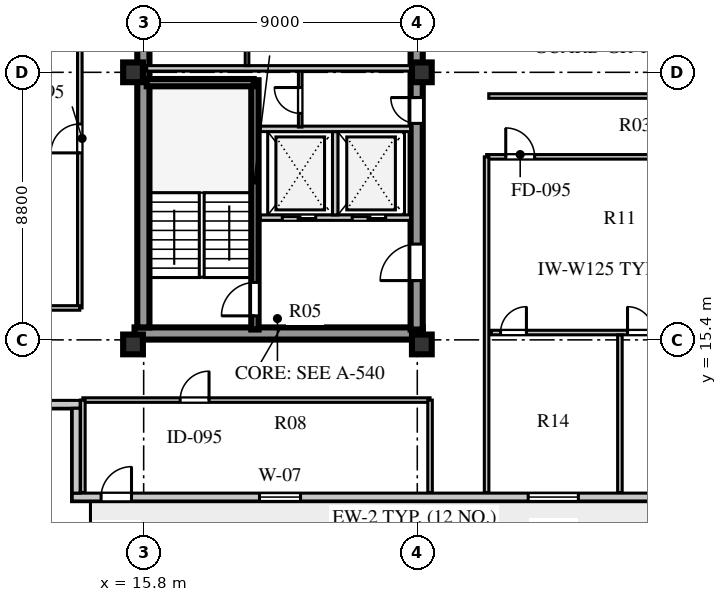
"""IFC4 building model, lengths in metres.
Left out: names, types, materials, properties, quantities, classifications, styles, units other than length and angle.
Written with IfcOpenShell. Run it as: python <this file> out.ifc"""

import sys

from ifc_helpers import new_model, si_unit, direction, frame, frame_2d, origin, origin_2d, place, context, subcontext, project, spatial, rectangle, extrude, element, fill, save


model = new_model("IFC4")
c1 = context("Model", 3, precision=1e-05, world=origin(), true_north=direction((0.0, 1.0)))
c2 = subcontext(c1, "Body", "Model", "MODEL_VIEW")
j1 = project(units=[si_unit("LENGTHUNIT", "METRE"), si_unit("PLANEANGLEUNIT", "RADIAN")], contexts=[c1])
p1 = place(None, origin())
s1 = spatial("IfcSite", under=j1, at=p1, CompositionType="ELEMENT")
p2 = place(p1, origin())
s2 = spatial("IfcBuilding", under=s1, at=p2, CompositionType="ELEMENT")
p3 = place(p2, frame((0.0, 0.0, 312.5)))
s3 = spatial("IfcBuildingStorey", under=s2, at=p3, CompositionType="ELEMENT", Elevation=312.5)
p4 = place(p3, frame((15.5, 15.61, 0.0), z_axis=(0.0, 0.0, 1.0), x_axis=(1.0, 0.0, 0.0)))
e1 = element("IfcWall", 1, at=p4, inside=s3, PredefinedType="SHEAR", context=c2, shape_type="SweptSolid", body=[
    extrude(rectangle(XDim=9.48, YDim=0.4, at=frame_2d((4.74, 0.0))), origin(), (0.0, 0.0, 1.0), 3.56),
])
p5 = place(p3, frame((15.79, 15.81, 0.0), z_axis=(0.0, 0.0, 1.0), x_axis=(0.0, 1.0, 0.0)))
e2 = element("IfcWall", 2, at=p5, inside=s3, PredefinedType="SHEAR", context=c2, shape_type="SweptSolid", body=[
    extrude(rectangle(XDim=25.63, YDim=0.4, at=frame_2d((12.815, 0.0))), origin(), (0.0, 0.0, 1.0), 3.56),
])
p6 = place(p3, frame((24.78, 15.74, 0.0), z_axis=(0.0, 0.0, 1.0), x_axis=(0.0, 1.0, 0.0)))
e3 = element("IfcWall", 3, at=p6, inside=s3, PredefinedType="SHEAR", context=c2, shape_type="SweptSolid", body=[
    extrude(rectangle(XDim=25.76, YDim=0.4, at=frame_2d((12.88, 0.0))), origin(), (0.0, 0.0, 1.0), 3.56),
])
p7 = place(p6, frame((1.61, 0.0, 0.0)))
e4 = element("IfcOpeningElement", 4, at=p7, cuts=e3, PredefinedType="OPENING", context=c2, shape_type="SweptSolid", body=[
    extrude(rectangle(XDim=1.2, YDim=2.1, at=frame_2d((0.6, 1.05))), frame((0.0, 0.21, 0.0), z_axis=(0.0, -1.0, 0.0), x_axis=(1.0, 0.0, 0.0)), (0.0, 0.0, 1.0), 0.42),
])
p8 = place(p6, frame((6.78, 0.0, 0.0)))
e5 = element("IfcOpeningElement", 5, at=p8, cuts=e3, PredefinedType="OPENING", context=c2, shape_type="SweptSolid", body=[
    extrude(rectangle(XDim=0.85, YDim=2.06, at=frame_2d((0.425, 1.03))), frame((0.0, 0.21, 0.0), z_axis=(0.0, -1.0, 0.0), x_axis=(1.0, 0.0, 0.0)), (0.0, 0.0, 1.0), 0.42),
])
p9 = place(p6, frame((12.11, 0.0, 0.0)))
e6 = element("IfcOpeningElement", 6, at=p9, cuts=e3, PredefinedType="OPENING", context=c2, shape_type="SweptSolid", body=[
    extrude(rectangle(XDim=1.5, YDim=2.12, at=frame_2d((0.75, 1.06))), frame((0.0, 0.21, 0.0), z_axis=(0.0, -1.0, 0.0), x_axis=(1.0, 0.0, 0.0)), (0.0, 0.0, 1.0), 0.42),
])
p10 = place(p6, frame((20.11, 0.0, 0.0)))
e7 = element("IfcOpeningElement", 7, at=p10, cuts=e3, PredefinedType="OPENING", context=c2, shape_type="SweptSolid", body=[
    extrude(rectangle(XDim=1.2, YDim=2.12, at=frame_2d((0.6, 1.06))), frame((0.0, 0.21, 0.0), z_axis=(0.0, -1.0, 0.0), x_axis=(1.0, 0.0, 0.0)), (0.0, 0.0, 1.0), 0.42),
])
p11 = place(p6, frame((24.01, 0.0, 0.0)))
e8 = element("IfcOpeningElement", 8, at=p11, cuts=e3, PredefinedType="OPENING", context=c2, shape_type="SweptSolid", body=[
    extrude(rectangle(XDim=0.95, YDim=2.1, at=frame_2d((0.475, 1.05))), frame((0.0, 0.21, 0.0), z_axis=(0.0, -1.0, 0.0), x_axis=(1.0, 0.0, 0.0)), (0.0, 0.0, 1.0), 0.42),
])
for number, where, z_axis, x_axis in (
    (9, (15.45, 15.25, 0.0), (0.0, 0.0, 1.0), (1.0, 0.0, 0.0)),
    (10, (15.45, 24.2, 0.0), (0.0, 0.0, 1.0), (1.0, 0.0, 0.0)),
    (11, (24.95, 15.25, 0.0), (0.0, 0.0, 1.0), (1.0, 0.0, 0.0)),
    (12, (24.95, 24.2, 0.0), (0.0, 0.0, 1.0), (1.0, 0.0, 0.0)),
):
    element("IfcColumn", number, at=place(p3, frame(where, z_axis=z_axis, x_axis=x_axis)), inside=s3, PredefinedType="COLUMN", context=c2, shape_type="SweptSolid", body=[
        extrude(rectangle(XDim=0.65, YDim=0.65, at=origin_2d()), origin(), (0.0, 0.0, 1.0), 3.56),
    ])
p12 = place(p3, frame((13.45, 10.23, 0.0), z_axis=(0.0, 0.0, 1.0), x_axis=(1.0, 0.0, 0.0)))
e13 = element("IfcWall", 13, at=p12, inside=s3, PredefinedType="SOLIDWALL", context=c2, shape_type="SweptSolid", body=[
    extrude(rectangle(XDim=31.7, YDim=0.26, at=frame_2d((15.85, 0.0))), origin(), (0.0, 0.0, 1.0), 3.56),
])
p13 = place(p12, frame((0.95, 0.0, 0.0)))
e14 = element("IfcOpeningElement", 14, at=p13, cuts=e13, PredefinedType="OPENING", context=c2, shape_type="SweptSolid", body=[
    extrude(rectangle(XDim=1.0, YDim=2.05, at=frame_2d((0.5, 1.025))), frame((0.0, 0.14, 0.0), z_axis=(0.0, -1.0, 0.0), x_axis=(1.0, 0.0, 0.0)), (0.0, 0.0, 1.0), 0.28),
])
p14 = place(p12, frame((6.16, 0.0, 0.8)))
e15 = element("IfcOpeningElement", 15, at=p14, cuts=e13, PredefinedType="OPENING", context=c2, shape_type="SweptSolid", body=[
    extrude(rectangle(XDim=1.35, YDim=1.9, at=frame_2d((0.675, 0.95))), frame((0.0, 0.14, 0.0), z_axis=(0.0, -1.0, 0.0), x_axis=(1.0, 0.0, 0.0)), (0.0, 0.0, 1.0), 0.28),
])
p15 = place(p12, frame((14.998, 0.0, 0.8)))
e16 = element("IfcOpeningElement", 16, at=p15, cuts=e13, PredefinedType="OPENING", context=c2, shape_type="SweptSolid", body=[
    extrude(rectangle(XDim=1.65, YDim=1.95, at=frame_2d((0.825, 0.975))), frame((0.0, 0.14, 0.0), z_axis=(0.0, -1.0, 0.0), x_axis=(1.0, 0.0, 0.0)), (0.0, 0.0, 1.0), 0.28),
])
p16 = place(p12, frame((20.883, 0.0, 0.8)))
e17 = element("IfcOpeningElement", 17, at=p16, cuts=e13, PredefinedType="OPENING", context=c2, shape_type="SweptSolid", body=[
    extrude(rectangle(XDim=1.95, YDim=2.0, at=frame_2d((0.975, 1.0))), frame((0.0, 0.14, 0.0), z_axis=(0.0, -1.0, 0.0), x_axis=(1.0, 0.0, 0.0)), (0.0, 0.0, 1.0), 0.28),
])
p17 = place(p12, frame((27.52, 0.0, 0.8)))
e18 = element("IfcOpeningElement", 18, at=p17, cuts=e13, PredefinedType="OPENING", context=c2, shape_type="SweptSolid", body=[
    extrude(rectangle(XDim=2.25, YDim=2.0, at=frame_2d((1.125, 1.0))), frame((0.0, 0.14, 0.0), z_axis=(0.0, -1.0, 0.0), x_axis=(1.0, 0.0, 0.0)), (0.0, 0.0, 1.0), 0.28),
])
p18 = place(p3, frame((10.4, 13.28, 0.0), z_axis=(0.0, 0.0, 1.0), x_axis=(1.0, 0.0, 0.0)))
e19 = element("IfcWall", 19, at=p18, inside=s3, PredefinedType="SOLIDWALL", context=c2, shape_type="SweptSolid", body=[
    extrude(rectangle(XDim=3.31, YDim=0.26, at=frame_2d((1.655, 0.0))), origin(), (0.0, 0.0, 1.0), 3.56),
])
p19 = place(p3, frame((13.58, 13.15, 0.0), z_axis=(0.0, 0.0, 1.0), x_axis=(0.0, -1.0, 0.0)))
e20 = element("IfcWall", 20, at=p19, inside=s3, PredefinedType="SOLIDWALL", context=c2, shape_type="SweptSolid", body=[
    extrude(rectangle(XDim=2.79, YDim=0.26, at=frame_2d((1.395, 0.0))), origin(), (0.0, 0.0, 1.0), 3.56),
])
p20 = place(p3, frame((19.46, 15.74, 0.0), z_axis=(0.0, 0.0, 1.0), x_axis=(0.0, 1.0, 0.0)))
e21 = element("IfcWall", 21, at=p20, inside=s3, PredefinedType="SHEAR", context=c2, shape_type="SweptSolid", body=[
    extrude(rectangle(XDim=8.2, YDim=0.24, at=frame_2d((4.1, 0.0))), origin(), (0.0, 0.0, 1.0), 3.8),
])
p21 = place(p20, frame((0.45, 0.0, 0.0)))
e22 = element("IfcOpeningElement", 22, at=p21, cuts=e21, PredefinedType="OPENING", context=c2, shape_type="SweptSolid", body=[
    extrude(rectangle(XDim=1.1, YDim=2.1, at=frame_2d((0.55, 1.05))), frame((0.0, 0.13, 0.0), z_axis=(0.0, -1.0, 0.0), x_axis=(1.0, 0.0, 0.0)), (0.0, 0.0, 1.0), 0.26),
])
p22 = place(p3, frame((15.9, 23.86, 0.0), z_axis=(0.0, 0.0, 1.0), x_axis=(1.0, 0.0, 0.0)))
e23 = element("IfcWall", 23, at=p22, inside=s3, PredefinedType="SHEAR", context=c2, shape_type="SweptSolid", body=[
    extrude(rectangle(XDim=3.52, YDim=0.24, at=frame_2d((1.76, 0.0))), origin(), (0.0, 0.0, 1.0), 3.8),
])
p23 = place(p3, frame((19.64, 19.42, 0.0), z_axis=(0.0, 0.0, 1.0), x_axis=(1.0, 0.0, 0.0)))
e24 = element("IfcWall", 24, at=p23, inside=s3, PredefinedType="SOLIDWALL", context=c2, shape_type="SweptSolid", body=[
    extrude(rectangle(XDim=4.94, YDim=0.18, at=frame_2d((2.47, 0.0))), origin(), (0.0, 0.0, 1.0), 3.56),
])
p24 = place(p23, frame((0.72, 0.0, 0.0)))
e25 = element("IfcOpeningElement", 25, at=p24, cuts=e24, PredefinedType="OPENING", context=c2, shape_type="SweptSolid", body=[
    extrude(rectangle(XDim=1.1, YDim=2.1, at=frame_2d((0.55, 1.05))), frame((0.0, 0.1, 0.0), z_axis=(0.0, -1.0, 0.0), x_axis=(1.0, 0.0, 0.0)), (0.0, 0.0, 1.0), 0.2),
])
p25 = place(p23, frame((3.02, 0.0, 0.0)))
e26 = element("IfcOpeningElement", 26, at=p25, cuts=e24, PredefinedType="OPENING", context=c2, shape_type="SweptSolid", body=[
    extrude(rectangle(XDim=1.1, YDim=2.1, at=frame_2d((0.55, 1.05))), frame((0.0, 0.1, 0.0), z_axis=(0.0, -1.0, 0.0), x_axis=(1.0, 0.0, 0.0)), (0.0, 0.0, 1.0), 0.2),
])
p26 = place(p3, frame((22.1, 19.51, 0.0), z_axis=(0.0, 0.0, 1.0), x_axis=(0.0, 1.0, 0.0)))
e27 = element("IfcWall", 27, at=p26, inside=s3, PredefinedType="SOLIDWALL", context=c2, shape_type="SweptSolid", body=[
    extrude(rectangle(XDim=2.74, YDim=0.18, at=frame_2d((1.37, 0.0))), origin(), (0.0, 0.0, 1.0), 3.56),
])
p27 = place(p3, frame((19.64, 22.34, 0.0), z_axis=(0.0, 0.0, 1.0), x_axis=(1.0, 0.0, 0.0)))
e28 = element("IfcWall", 28, at=p27, inside=s3, PredefinedType="SOLIDWALL", context=c2, shape_type="SweptSolid", body=[
    extrude(rectangle(XDim=4.94, YDim=0.18, at=frame_2d((2.47, 0.0))), origin(), (0.0, 0.0, 1.0), 3.56),
])
p28 = place(p3, frame((20.95, 22.4, 0.0), z_axis=(0.0, 0.0, 1.0), x_axis=(0.0, 1.0, 0.0)))
e29 = element("IfcWall", 29, at=p28, inside=s3, PredefinedType="PARTITIONING", context=c2, shape_type="SweptSolid", body=[
    extrude(rectangle(XDim=1.88, YDim=0.12, at=frame_2d((0.94, 0.0))), origin(), (0.0, 0.0, 1.0), 3.56),
])
p29 = place(p28, frame((0.45, 0.0, 0.0)))
e30 = element("IfcOpeningElement", 30, at=p29, cuts=e29, PredefinedType="OPENING", context=c2, shape_type="SweptSolid", body=[
    extrude(rectangle(XDim=0.85, YDim=2.06, at=frame_2d((0.425, 1.03))), frame((0.0, 0.07, 0.0), z_axis=(0.0, -1.0, 0.0), x_axis=(1.0, 0.0, 0.0)), (0.0, 0.0, 1.0), 0.14),
])
p30 = place(p3, frame((15.9, 24.33, 0.0), z_axis=(0.0, 0.0, 1.0), x_axis=(1.0, 0.0, 0.0)))
e31 = element("IfcWall", 31, at=p30, inside=s3, PredefinedType="SOLIDWALL", context=c2, shape_type="SweptSolid", body=[
    extrude(rectangle(XDim=8.68, YDim=0.18, at=frame_2d((4.34, 0.0))), origin(), (0.0, 0.0, 1.0), 2.96),
])
p31 = place(p3, frame((19.2, 24.42, 0.0), z_axis=(0.0, 0.0, 1.0), x_axis=(0.0, 1.0, 0.0)))
e32 = element("IfcWall", 32, at=p31, inside=s3, PredefinedType="PARTITIONING", context=c2, shape_type="SweptSolid", body=[
    extrude(rectangle(XDim=2.02, YDim=0.12, at=frame_2d((1.01, 0.0))), origin(), (0.0, 0.0, 1.0), 3.56),
])
p32 = place(p3, frame((27.08, 21.42, 0.0), z_axis=(0.0, 0.0, 1.0), x_axis=(1.0, 0.0, 0.0)))
e33 = element("IfcWall", 33, at=p32, inside=s3, PredefinedType="PARTITIONING", context=c2, shape_type="SweptSolid", body=[
    extrude(rectangle(XDim=12.07, YDim=0.15, at=frame_2d((6.035, 0.0))), origin(), (0.0, 0.0, 1.0), 3.26),
])
p33 = place(p32, frame((0.63, 0.0, 0.0)))
e34 = element("IfcOpeningElement", 34, at=p33, cuts=e33, PredefinedType="OPENING", context=c2, shape_type="SweptSolid", body=[
    extrude(rectangle(XDim=0.95, YDim=2.1, at=frame_2d((0.475, 1.05))), frame((0.0, 0.085, 0.0), z_axis=(0.0, -1.0, 0.0), x_axis=(1.0, 0.0, 0.0)), (0.0, 0.0, 1.0), 0.17),
])
p34 = place(p3, frame((27.08, 10.38, 0.0), z_axis=(0.0, 0.0, 1.0), x_axis=(0.0, 1.0, 0.0)))
e35 = element("IfcWall", 35, at=p34, inside=s3, PredefinedType="PARTITIONING", context=c2, shape_type="SweptSolid", body=[
    extrude(rectangle(XDim=11.04, YDim=0.15, at=frame_2d((5.52, 0.0))), origin(), (0.0, 0.0, 1.0), 3.56),
])
p35 = place(p3, frame((27.15, 23.42, 0.0), z_axis=(0.0, 0.0, 1.0), x_axis=(1.0, 0.0, 0.0)))
e36 = element("IfcWall", 36, at=p35, inside=s3, PredefinedType="PARTITIONING", context=c2, shape_type="SweptSolid", body=[
    extrude(rectangle(XDim=6.0, YDim=0.15, at=frame_2d((3.0, 0.0))), origin(), (0.0, 0.0, 1.0), 3.56),
])
p36 = place(p3, frame((13.8, 13.42, 0.0), z_axis=(0.0, 0.0, 1.0), x_axis=(1.0, 0.0, 0.0)))
e37 = element("IfcWall", 37, at=p36, inside=s3, PredefinedType="PARTITIONING", context=c2, shape_type="SweptSolid", body=[
    extrude(rectangle(XDim=11.42, YDim=0.15, at=frame_2d((5.71, 0.0))), origin(), (0.0, 0.0, 1.0), 3.56),
])
p37 = place(p36, frame((3.2, 0.0, 0.0)))
e38 = element("IfcOpeningElement", 38, at=p37, cuts=e37, PredefinedType="OPENING", context=c2, shape_type="SweptSolid", body=[
    extrude(rectangle(XDim=0.95, YDim=2.08, at=frame_2d((0.475, 1.04))), frame((0.0, 0.085, 0.0), z_axis=(0.0, -1.0, 0.0), x_axis=(1.0, 0.0, 0.0)), (0.0, 0.0, 1.0), 0.17),
])
p38 = place(p3, frame((13.8, 10.38, 0.0), z_axis=(0.0, 0.0, 1.0), x_axis=(0.0, 1.0, 0.0)))
e39 = element("IfcWall", 39, at=p38, inside=s3, PredefinedType="PARTITIONING", context=c2, shape_type="SweptSolid", body=[
    extrude(rectangle(XDim=3.04, YDim=0.15, at=frame_2d((1.52, 0.0))), origin(), (0.0, 0.0, 1.0), 3.56),
])
p39 = place(p3, frame((25.22, 10.38, 0.0), z_axis=(0.0, 0.0, 1.0), x_axis=(0.0, 1.0, 0.0)))
e40 = element("IfcWall", 40, at=p39, inside=s3, PredefinedType="PARTITIONING", context=c2, shape_type="SweptSolid", body=[
    extrude(rectangle(XDim=3.04, YDim=0.15, at=frame_2d((1.52, 0.0))), origin(), (0.0, 0.0, 1.0), 3.11),
])
p40 = place(p3, frame((13.7, 16.45, 0.0), z_axis=(0.0, 0.0, 1.0), x_axis=(0.0, 1.0, 0.0)))
e41 = element("IfcWall", 41, at=p40, inside=s3, PredefinedType="PARTITIONING", context=c2, shape_type="SweptSolid", body=[
    extrude(rectangle(XDim=24.3, YDim=0.15, at=frame_2d((12.15, 0.0))), origin(), (0.0, 0.0, 1.0), 3.56),
])
p41 = place(p40, frame((5.1, 0.0, 0.0)))
e42 = element("IfcOpeningElement", 42, at=p41, cuts=e41, PredefinedType="OPENING", context=c2, shape_type="SweptSolid", body=[
    extrude(rectangle(XDim=0.95, YDim=2.08, at=frame_2d((0.475, 1.04))), frame((0.0, 0.085, 0.0), z_axis=(0.0, -1.0, 0.0), x_axis=(1.0, 0.0, 0.0)), (0.0, 0.0, 1.0), 0.17),
])
p42 = place(p3, frame((10.68, 16.45, 0.0), z_axis=(0.0, 0.0, 1.0), x_axis=(1.0, 0.0, 0.0)))
e43 = element("IfcWall", 43, at=p42, inside=s3, PredefinedType="PARTITIONING", context=c2, shape_type="SweptSolid", body=[
    extrude(rectangle(XDim=3.02, YDim=0.15, at=frame_2d((1.51, 0.0))), origin(), (0.0, 0.0, 1.0), 3.56),
])
p43 = place(p3, frame((27.24, 15.641, 0.0), z_axis=(0.0, 0.0, 1.0), x_axis=(1.0, 0.0, 0.0)))
e44 = element("IfcWall", 44, at=p43, inside=s3, PredefinedType="PARTITIONING", context=c2, shape_type="SweptSolid", body=[
    extrude(rectangle(XDim=11.83, YDim=0.15, at=frame_2d((5.915, 0.0))), origin(), (0.0, 0.0, 1.0), 3.56),
])
p44 = place(p43, frame((0.3, 0.0, 0.0)))
e45 = element("IfcOpeningElement", 45, at=p44, cuts=e44, PredefinedType="OPENING", context=c2, shape_type="SweptSolid", body=[
    extrude(rectangle(XDim=0.85, YDim=2.08, at=frame_2d((0.425, 1.04))), frame((0.0, 0.085, 0.0), z_axis=(0.0, -1.0, 0.0), x_axis=(1.0, 0.0, 0.0)), (0.0, 0.0, 1.0), 0.17),
])
p45 = place(p43, frame((4.475, 0.0, 0.0)))
e46 = element("IfcOpeningElement", 46, at=p45, cuts=e44, PredefinedType="OPENING", context=c2, shape_type="SweptSolid", body=[
    extrude(rectangle(XDim=0.85, YDim=2.08, at=frame_2d((0.425, 1.04))), frame((0.0, 0.085, 0.0), z_axis=(0.0, -1.0, 0.0), x_axis=(1.0, 0.0, 0.0)), (0.0, 0.0, 1.0), 0.17),
])
p46 = place(p3, frame((31.465, 10.38, 0.0), z_axis=(0.0, 0.0, 1.0), x_axis=(0.0, 1.0, 0.0)))
e47 = element("IfcWall", 47, at=p46, inside=s3, PredefinedType="PARTITIONING", context=c2, shape_type="SweptSolid", body=[
    extrude(rectangle(XDim=5.181, YDim=0.15, at=frame_2d((2.591, 0.0))), origin(), (0.0, 0.0, 1.0), 3.56),
])
p47 = place(p13, frame((1.0, 0.0, 0.0), z_axis=(0.0, 0.0, 1.0), x_axis=(-1.0, 0.0, 0.0)))
e48 = element("IfcDoor", 48, at=p47, inside=s3, OperationType="SINGLE_SWING_LEFT", PredefinedType="DOOR", context=c2, shape_type="SweptSolid", body=[
    extrude(rectangle(XDim=1.0, YDim=2.05, at=frame_2d((0.5, 1.025))), frame((0.0, 0.025, 0.0), z_axis=(0.0, -1.0, 0.0), x_axis=(1.0, 0.0, 0.0)), (0.0, 0.0, 1.0), 0.05),
])
fill(e14, e48)
p48 = place(p14, origin())
e49 = element("IfcWindow", 49, at=p48, inside=s3, PartitioningType="SINGLE_PANEL", PredefinedType="WINDOW", context=c2, shape_type="SweptSolid", body=[
    extrude(rectangle(XDim=1.35, YDim=1.9, at=frame_2d((0.675, 0.95))), frame((0.0, 0.03, 0.0), z_axis=(0.0, -1.0, 0.0), x_axis=(1.0, 0.0, 0.0)), (0.0, 0.0, 1.0), 0.06),
])
fill(e15, e49)
p49 = place(p15, origin())
e50 = element("IfcWindow", 50, at=p49, inside=s3, PartitioningType="SINGLE_PANEL", PredefinedType="WINDOW", context=c2, shape_type="SweptSolid", body=[
    extrude(rectangle(XDim=1.65, YDim=1.95, at=frame_2d((0.825, 0.975))), frame((0.0, 0.03, 0.0), z_axis=(0.0, -1.0, 0.0), x_axis=(1.0, 0.0, 0.0)), (0.0, 0.0, 1.0), 0.06),
])
fill(e16, e50)
p50 = place(p21, origin())
e51 = element("IfcDoor", 51, at=p50, inside=s3, OperationType="SINGLE_SWING_LEFT", PredefinedType="DOOR", context=c2, shape_type="SweptSolid", body=[
    extrude(rectangle(XDim=1.1, YDim=2.1, at=frame_2d((0.55, 1.05))), frame((0.0, 0.025, 0.0), z_axis=(0.0, -1.0, 0.0), x_axis=(1.0, 0.0, 0.0)), (0.0, 0.0, 1.0), 0.05),
])
fill(e22, e51)
p51 = place(p24, origin())
e52 = element("IfcDoor", 52, at=p51, inside=s3, OperationType="DOUBLE_DOOR_SLIDING", PredefinedType="DOOR", context=c2, shape_type="SweptSolid", body=[
    extrude(rectangle(XDim=1.1, YDim=2.1, at=frame_2d((0.55, 1.05))), frame((0.0, 0.025, 0.0), z_axis=(0.0, -1.0, 0.0), x_axis=(1.0, 0.0, 0.0)), (0.0, 0.0, 1.0), 0.05),
])
fill(e25, e52)
p52 = place(p25, origin())
e53 = element("IfcDoor", 53, at=p52, inside=s3, OperationType="DOUBLE_DOOR_SLIDING", PredefinedType="DOOR", context=c2, shape_type="SweptSolid", body=[
    extrude(rectangle(XDim=1.1, YDim=2.1, at=frame_2d((0.55, 1.05))), frame((0.0, 0.025, 0.0), z_axis=(0.0, -1.0, 0.0), x_axis=(1.0, 0.0, 0.0)), (0.0, 0.0, 1.0), 0.05),
])
fill(e26, e53)
p53 = place(p7, frame((1.2, 0.0, 0.0), z_axis=(0.0, 0.0, 1.0), x_axis=(-1.0, 0.0, 0.0)))
e54 = element("IfcDoor", 54, at=p53, inside=s3, OperationType="SINGLE_SWING_RIGHT", PredefinedType="DOOR", context=c2, shape_type="SweptSolid", body=[
    extrude(rectangle(XDim=1.2, YDim=2.1, at=frame_2d((0.6, 1.05))), frame((0.0, 0.025, 0.0), z_axis=(0.0, -1.0, 0.0), x_axis=(1.0, 0.0, 0.0)), (0.0, 0.0, 1.0), 0.05),
])
fill(e4, e54)
p54 = place(p29, origin())
e55 = element("IfcDoor", 55, at=p54, inside=s3, OperationType="SINGLE_SWING_RIGHT", PredefinedType="DOOR", context=c2, shape_type="SweptSolid", body=[
    extrude(rectangle(XDim=0.85, YDim=2.06, at=frame_2d((0.425, 1.03))), frame((0.0, 0.025, 0.0), z_axis=(0.0, -1.0, 0.0), x_axis=(1.0, 0.0, 0.0)), (0.0, 0.0, 1.0), 0.05),
])
fill(e30, e55)
p55 = place(p8, frame((0.85, 0.0, 0.0), z_axis=(0.0, 0.0, 1.0), x_axis=(-1.0, 0.0, 0.0)))
e56 = element("IfcDoor", 56, at=p55, inside=s3, OperationType="SINGLE_SWING_LEFT", PredefinedType="DOOR", context=c2, shape_type="SweptSolid", body=[
    extrude(rectangle(XDim=0.85, YDim=2.06, at=frame_2d((0.425, 1.03))), frame((0.0, 0.025, 0.0), z_axis=(0.0, -1.0, 0.0), x_axis=(1.0, 0.0, 0.0)), (0.0, 0.0, 1.0), 0.05),
])
fill(e5, e56)
p56 = place(p37, frame((0.95, 0.0, 0.0), z_axis=(0.0, 0.0, 1.0), x_axis=(-1.0, 0.0, 0.0)))
e57 = element("IfcDoor", 57, at=p56, inside=s3, OperationType="SINGLE_SWING_LEFT", PredefinedType="DOOR", context=c2, shape_type="SweptSolid", body=[
    extrude(rectangle(XDim=0.95, YDim=2.08, at=frame_2d((0.475, 1.04))), frame((0.0, 0.025, 0.0), z_axis=(0.0, -1.0, 0.0), x_axis=(1.0, 0.0, 0.0)), (0.0, 0.0, 1.0), 0.05),
])
fill(e38, e57)
p57 = place(p41, origin())
e58 = element("IfcDoor", 58, at=p57, inside=s3, OperationType="SINGLE_SWING_LEFT", PredefinedType="DOOR", context=c2, shape_type="SweptSolid", body=[
    extrude(rectangle(XDim=0.95, YDim=2.08, at=frame_2d((0.475, 1.04))), frame((0.0, 0.025, 0.0), z_axis=(0.0, -1.0, 0.0), x_axis=(1.0, 0.0, 0.0)), (0.0, 0.0, 1.0), 0.05),
])
fill(e42, e58)
p58 = place(p44, frame((0.85, 0.0, 0.0), z_axis=(0.0, 0.0, 1.0), x_axis=(-1.0, 0.0, 0.0)))
e59 = element("IfcDoor", 59, at=p58, inside=s3, OperationType="SINGLE_SWING_LEFT", PredefinedType="DOOR", context=c2, shape_type="SweptSolid", body=[
    extrude(rectangle(XDim=0.85, YDim=2.08, at=frame_2d((0.425, 1.04))), frame((0.0, 0.025, 0.0), z_axis=(0.0, -1.0, 0.0), x_axis=(1.0, 0.0, 0.0)), (0.0, 0.0, 1.0), 0.05),
])
fill(e45, e59)
p59 = place(p45, frame((0.85, 0.0, 0.0), z_axis=(0.0, 0.0, 1.0), x_axis=(-1.0, 0.0, 0.0)))
e60 = element("IfcDoor", 60, at=p59, inside=s3, OperationType="SINGLE_SWING_RIGHT", PredefinedType="DOOR", context=c2, shape_type="SweptSolid", body=[
    extrude(rectangle(XDim=0.85, YDim=2.08, at=frame_2d((0.425, 1.04))), frame((0.0, 0.025, 0.0), z_axis=(0.0, -1.0, 0.0), x_axis=(1.0, 0.0, 0.0)), (0.0, 0.0, 1.0), 0.05),
])
fill(e46, e60)
p60 = place(p33, frame((0.95, 0.0, 0.0), z_axis=(0.0, 0.0, 1.0), x_axis=(-1.0, 0.0, 0.0)))
e61 = element("IfcDoor", 61, at=p60, inside=s3, OperationType="SINGLE_SWING_RIGHT", PredefinedType="DOOR", context=c2, shape_type="SweptSolid", body=[
    extrude(rectangle(XDim=0.95, YDim=2.1, at=frame_2d((0.475, 1.05))), frame((0.0, 0.025, 0.0), z_axis=(0.0, -1.0, 0.0), x_axis=(1.0, 0.0, 0.0)), (0.0, 0.0, 1.0), 0.05),
])
fill(e34, e61)
save(model, sys.argv[1])
